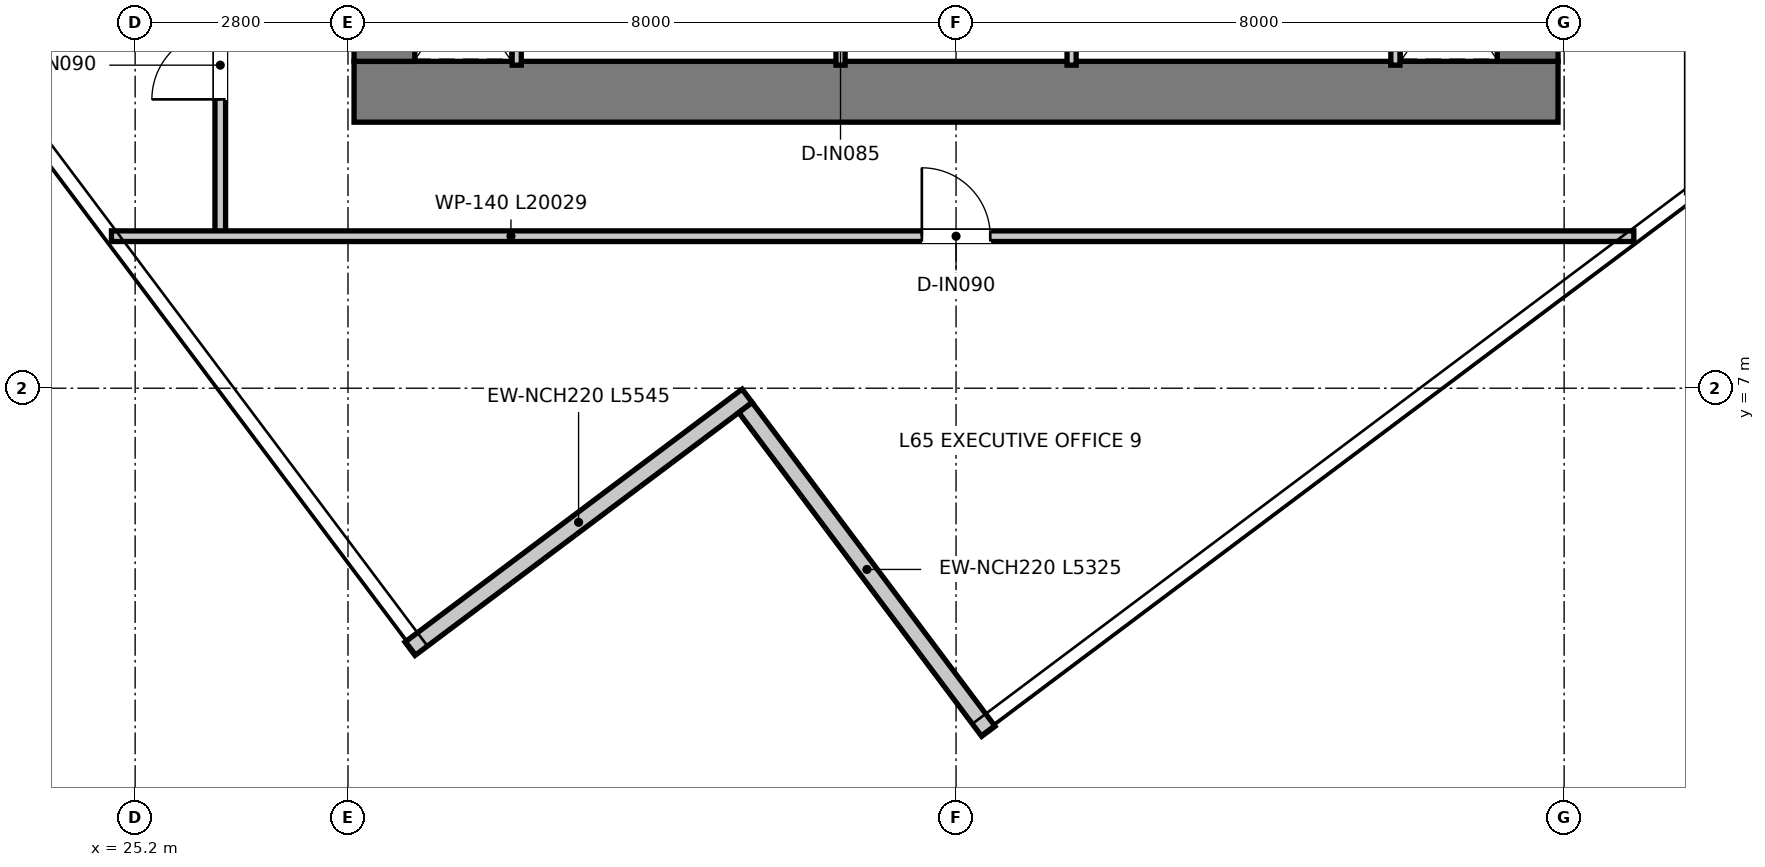
"""IFC4 building model, lengths in metres.
Left out: names, types, materials, properties, quantities, classifications, styles, units other than length and angle.
Written with IfcOpenShell. Run it as: python <this file> out.ifc"""

import sys

from ifc_helpers import new_model, si_unit, direction, frame, frame_2d, origin, place, context, subcontext, project, spatial, rectangle, extrude, element, fill, save


model = new_model("IFC4")
c1 = context("Model", 3, precision=1e-05, world=origin(), true_north=direction((0.0, 1.0)))
c2 = subcontext(c1, "Body", "Model", "MODEL_VIEW")
j1 = project(units=[si_unit("LENGTHUNIT", "METRE"), si_unit("PLANEANGLEUNIT", "RADIAN")], contexts=[c1])
p1 = place(None, origin())
s1 = spatial("IfcSite", under=j1, at=p1, CompositionType="ELEMENT")
p2 = place(p1, origin())
s2 = spatial("IfcBuilding", under=s1, at=p2, CompositionType="ELEMENT")
p3 = place(p2, frame((0.0, 0.0, 267.4)))
s3 = spatial("IfcBuildingStorey", under=s2, at=p3, CompositionType="ELEMENT", Elevation=267.4)
p4 = place(p3, frame((28.08, 10.9, 0.0), z_axis=(0.0, 0.0, 1.0), x_axis=(1.0, 0.0, 0.0)))
e1 = element("IfcWall", 1, at=p4, inside=s3, PredefinedType="SHEAR", context=c2, shape_type="SweptSolid", body=[
    extrude(rectangle(XDim=15.84, YDim=0.8, at=frame_2d((7.92, 0.0))), origin(), (0.0, 0.0, 1.0), 3.95),
])
for number, where, z_axis, x_axis in (
    (2, (28.48, 11.3, 0.0), (0.0, 0.0, 1.0), (0.0, 1.0, 0.0)),
    (3, (43.52, 11.3, 0.0), (0.0, 0.0, 1.0), (0.0, 1.0, 0.0)),
):
    element("IfcWall", number, at=place(p3, frame(where, z_axis=z_axis, x_axis=x_axis)), inside=s3, PredefinedType="SHEAR", context=c2, shape_type="SweptSolid", body=[
        extrude(rectangle(XDim=14.7, YDim=0.8, at=frame_2d((7.35, 0.0))), origin(), (0.0, 0.0, 1.0), 3.95),
    ])
p5 = place(p3, frame((28.816, 3.572, 0.0), z_axis=(0.0, 0.0, 1.0), x_axis=(0.799936592369, 0.600084534203, 0.0)))
e4 = element("IfcWall", 4, at=p5, inside=s3, PredefinedType="ELEMENTEDWALL", context=c2, shape_type="SweptSolid", body=[
    extrude(rectangle(XDim=5.545, YDim=0.22, at=frame_2d((2.772, 0.0))), origin(), (0.0, 0.0, 1.0), 3.67),
])
p6 = place(p3, frame((33.23, 6.746, 0.0), z_axis=(0.0, 0.0, 1.0), x_axis=(0.600058683831, -0.799955983763, 0.0)))
e5 = element("IfcWall", 5, at=p6, inside=s3, PredefinedType="ELEMENTEDWALL", context=c2, shape_type="SweptSolid", body=[
    extrude(rectangle(XDim=5.325, YDim=0.22, at=frame_2d((2.663, 0.0))), origin(), (0.0, 0.0, 1.0), 3.67),
])
for number, where, z_axis, x_axis in (
    (6, (30.22, 11.25, 0.0), (0.0, 0.0, 1.0), (0.0, 1.0, 0.0)),
    (7, (41.78, 11.25, 0.0), (0.0, 0.0, 1.0), (0.0, 1.0, 0.0)),
):
    element("IfcWall", number, at=place(p3, frame(where, z_axis=z_axis, x_axis=x_axis)), inside=s3, PredefinedType="PARTITIONING", context=c2, shape_type="SweptSolid", body=[
        extrude(rectangle(XDim=1.97, YDim=0.12, at=frame_2d((0.985, 0.0))), origin(), (0.0, 0.0, 1.0), 3.67),
    ])
p7 = place(p3, frame((34.48, 11.25, 0.0), z_axis=(0.0, 0.0, 1.0), x_axis=(0.0, 1.0, 0.0)))
e8 = element("IfcWall", 8, at=p7, inside=s3, PredefinedType="PARTITIONING", context=c2, shape_type="SweptSolid", body=[
    extrude(rectangle(XDim=1.97, YDim=0.12, at=frame_2d((0.985, 0.0))), origin(), (0.0, 0.0, 1.0), 3.67),
])
p8 = place(p7, frame((0.545, 0.0, 0.0)))
e9 = element("IfcOpeningElement", 9, at=p8, cuts=e8, PredefinedType="OPENING", context=c2, shape_type="SweptSolid", body=[
    extrude(rectangle(XDim=0.85, YDim=2.1, at=frame_2d((0.425, 1.05))), frame((0.0, 0.07, 0.0), z_axis=(0.0, -1.0, 0.0), x_axis=(1.0, 0.0, 0.0)), (0.0, 0.0, 1.0), 0.14),
])
p9 = place(p3, frame((37.52, 11.25, 0.0), z_axis=(0.0, 0.0, 1.0), x_axis=(0.0, 1.0, 0.0)))
e10 = element("IfcWall", 10, at=p9, inside=s3, PredefinedType="PARTITIONING", context=c2, shape_type="SweptSolid", body=[
    extrude(rectangle(XDim=1.97, YDim=0.12, at=frame_2d((0.985, 0.0))), origin(), (0.0, 0.0, 1.0), 3.67),
])
p10 = place(p9, frame((0.545, 0.0, 0.0)))
e11 = element("IfcOpeningElement", 11, at=p10, cuts=e10, PredefinedType="OPENING", context=c2, shape_type="SweptSolid", body=[
    extrude(rectangle(XDim=0.85, YDim=2.1, at=frame_2d((0.425, 1.05))), frame((0.0, 0.07, 0.0), z_axis=(0.0, -1.0, 0.0), x_axis=(1.0, 0.0, 0.0)), (0.0, 0.0, 1.0), 0.14),
])
p11 = place(p3, frame((26.32, 9.0, 0.0), z_axis=(0.0, 0.0, 1.0), x_axis=(0.0, 1.0, 0.0)))
e12 = element("IfcWall", 12, at=p11, inside=s3, PredefinedType="PARTITIONING", context=c2, shape_type="SweptSolid", body=[
    extrude(rectangle(XDim=19.66, YDim=0.14, at=frame_2d((9.83, 0.0))), origin(), (0.0, 0.0, 1.0), 3.13),
])
p12 = place(p11, frame((18.3, 0.0, 0.0)))
e13 = element("IfcOpeningElement", 13, at=p12, cuts=e12, PredefinedType="OPENING", context=c2, shape_type="SweptSolid", body=[
    extrude(rectangle(XDim=0.9, YDim=2.1, at=frame_2d((0.45, 1.05))), frame((0.0, 0.08, 0.0), z_axis=(0.0, -1.0, 0.0), x_axis=(1.0, 0.0, 0.0)), (0.0, 0.0, 1.0), 0.16),
])
p13 = place(p11, frame((1.8, 0.0, 0.0)))
e14 = element("IfcOpeningElement", 14, at=p13, cuts=e12, PredefinedType="OPENING", context=c2, shape_type="SweptSolid", body=[
    extrude(rectangle(XDim=0.9, YDim=2.1, at=frame_2d((0.45, 1.05))), frame((0.0, 0.08, 0.0), z_axis=(0.0, -1.0, 0.0), x_axis=(1.0, 0.0, 0.0)), (0.0, 0.0, 1.0), 0.16),
])
p14 = place(p11, frame((9.55, 0.0, 0.0)))
e15 = element("IfcOpeningElement", 15, at=p14, cuts=e12, PredefinedType="OPENING", context=c2, shape_type="SweptSolid", body=[
    extrude(rectangle(XDim=0.9, YDim=2.1, at=frame_2d((0.45, 1.05))), frame((0.0, 0.08, 0.0), z_axis=(0.0, -1.0, 0.0), x_axis=(1.0, 0.0, 0.0)), (0.0, 0.0, 1.0), 0.16),
])
p15 = place(p11, frame((14.21, 0.0, 0.0)))
e16 = element("IfcOpeningElement", 16, at=p15, cuts=e12, PredefinedType="OPENING", context=c2, shape_type="SweptSolid", body=[
    extrude(rectangle(XDim=0.9, YDim=2.1, at=frame_2d((0.45, 1.05))), frame((0.0, 0.08, 0.0), z_axis=(0.0, -1.0, 0.0), x_axis=(1.0, 0.0, 0.0)), (0.0, 0.0, 1.0), 0.16),
])
p16 = place(p3, frame((24.888, 9.0, 0.0), z_axis=(0.0, 0.0, 1.0), x_axis=(1.0, 0.0, 0.0)))
e17 = element("IfcWall", 17, at=p16, inside=s3, PredefinedType="PARTITIONING", context=c2, shape_type="SweptSolid", body=[
    extrude(rectangle(XDim=20.029, YDim=0.14, at=frame_2d((10.015, 0.0))), origin(), (0.0, 0.0, 1.0), 3.67),
])
p17 = place(p16, frame((10.662, 0.0, 0.0)))
e18 = element("IfcOpeningElement", 18, at=p17, cuts=e17, PredefinedType="OPENING", context=c2, shape_type="SweptSolid", body=[
    extrude(rectangle(XDim=0.9, YDim=2.1, at=frame_2d((0.45, 1.05))), frame((0.0, 0.08, 0.0), z_axis=(0.0, -1.0, 0.0), x_axis=(1.0, 0.0, 0.0)), (0.0, 0.0, 1.0), 0.16),
])
p18 = place(p13, origin())
e19 = element("IfcDoor", 19, at=p18, inside=s3, OperationType="SINGLE_SWING_LEFT", PredefinedType="DOOR", context=c2, shape_type="SweptSolid", body=[
    extrude(rectangle(XDim=0.9, YDim=2.1, at=frame_2d((0.45, 1.05))), frame((0.0, 0.025, 0.0), z_axis=(0.0, -1.0, 0.0), x_axis=(1.0, 0.0, 0.0)), (0.0, 0.0, 1.0), 0.05),
])
fill(e14, e19)
p19 = place(p17, origin())
e20 = element("IfcDoor", 20, at=p19, inside=s3, OperationType="SINGLE_SWING_LEFT", PredefinedType="DOOR", context=c2, shape_type="SweptSolid", body=[
    extrude(rectangle(XDim=0.9, YDim=2.1, at=frame_2d((0.45, 1.05))), frame((0.0, 0.025, 0.0), z_axis=(0.0, -1.0, 0.0), x_axis=(1.0, 0.0, 0.0)), (0.0, 0.0, 1.0), 0.05),
])
fill(e18, e20)
save(model, sys.argv[1])
